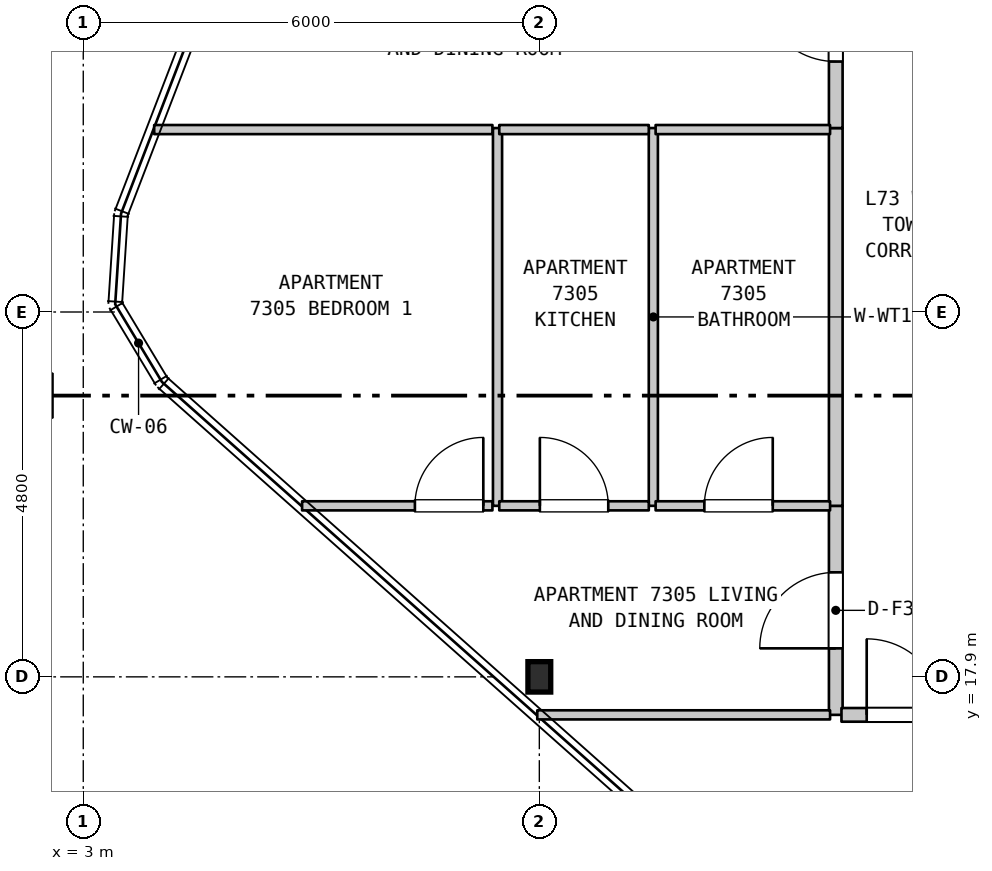
"""IFC4 building model, lengths in metres.
Left out: names, types, materials, properties, quantities, classifications, styles, units other than length and angle.
Written with IfcOpenShell. Run it as: python <this file> out.ifc"""

import sys

from ifc_helpers import new_model, si_unit, direction, frame, frame_2d, origin, origin_2d, place, context, subcontext, project, spatial, rectangle, i_section, extrude, element, fill, save


model = new_model("IFC4")
c1 = context("Model", 3, precision=1e-05, world=origin(), true_north=direction((0.0, 1.0)))
c2 = subcontext(c1, "Body", "Model", "MODEL_VIEW")
j1 = project(units=[si_unit("LENGTHUNIT", "METRE"), si_unit("PLANEANGLEUNIT", "RADIAN")], contexts=[c1])
p1 = place(None, origin())
s1 = spatial("IfcSite", under=j1, at=p1, CompositionType="ELEMENT")
p2 = place(p1, origin())
s2 = spatial("IfcBuilding", under=s1, at=p2, CompositionType="ELEMENT")
p3 = place(p2, frame((0.0, 0.0, 291.7)))
s3 = spatial("IfcBuildingStorey", under=s2, at=p3, CompositionType="ELEMENT", Elevation=291.7)
p4 = place(p3, frame((9.0, 17.9, 0.0), z_axis=(0.0, 0.0, 1.0), x_axis=(1.0, 0.0, 0.0)))
e1 = element("IfcColumn", 1, at=p4, inside=s3, PredefinedType="COLUMN", context=c2, shape_type="SweptSolid", body=[
    extrude(i_section(OverallWidth=0.3, OverallDepth=0.4, WebThickness=0.013, FlangeThickness=0.024, FilletRadius=0.027, at=origin_2d()), origin(), (0.0, 0.0, 1.0), 3.7),
])
for number, where, z_axis, x_axis in (
    (2, (8.45, 20.15, 0.0), (0.0, 0.0, 1.0), (0.0, 1.0, 0.0)),
    (3, (10.5, 20.15, 0.0), (0.0, 0.0, 1.0), (0.0, 1.0, 0.0)),
):
    element("IfcWall", number, at=place(p3, frame(where, z_axis=z_axis, x_axis=x_axis)), inside=s3, PredefinedType="PARTITIONING", context=c2, shape_type="SweptSolid", body=[
        extrude(rectangle(XDim=4.97, YDim=0.12, at=frame_2d((2.485, 0.0))), origin(), (0.0, 0.0, 1.0), 3.39),
    ])
p5 = place(p3, frame((12.9, 17.4, 0.0), z_axis=(0.0, 0.0, 1.0), x_axis=(0.0, 1.0, 0.0)))
e4 = element("IfcWall", 4, at=p5, inside=s3, PredefinedType="STANDARD", context=c2, shape_type="SweptSolid", body=[
    extrude(rectangle(XDim=2.75, YDim=0.18, at=frame_2d((1.375, 0.0))), origin(), (0.0, 0.0, 1.0), 3.39),
])
p6 = place(p5, frame((0.875, 0.0, 0.0)))
e5 = element("IfcOpeningElement", 5, at=p6, cuts=e4, PredefinedType="OPENING", context=c2, shape_type="SweptSolid", body=[
    extrude(rectangle(XDim=1.0, YDim=2.15, at=frame_2d((0.5, 1.075))), frame((0.0, 0.1, 0.0), z_axis=(0.0, -1.0, 0.0), x_axis=(1.0, 0.0, 0.0)), (0.0, 0.0, 1.0), 0.2),
])
p7 = place(p3, frame((12.9, 20.15, 0.0), z_axis=(0.0, 0.0, 1.0), x_axis=(0.0, 1.0, 0.0)))
e6 = element("IfcWall", 6, at=p7, inside=s3, PredefinedType="STANDARD", context=c2, shape_type="SweptSolid", body=[
    extrude(rectangle(XDim=4.97, YDim=0.18, at=frame_2d((2.485, 0.0))), origin(), (0.0, 0.0, 1.0), 3.39),
])
p8 = place(p3, frame((12.9, 25.12, 0.0), z_axis=(0.0, 0.0, 1.0), x_axis=(0.0, 1.0, 0.0)))
e7 = element("IfcWall", 7, at=p8, inside=s3, PredefinedType="STANDARD", context=c2, shape_type="SweptSolid", body=[
    extrude(rectangle(XDim=2.75, YDim=0.18, at=frame_2d((1.375, 0.0))), origin(), (0.0, 0.0, 1.0), 3.39),
])
p9 = place(p8, frame((0.875, 0.0, 0.0)))
e8 = element("IfcOpeningElement", 8, at=p9, cuts=e7, PredefinedType="OPENING", context=c2, shape_type="SweptSolid", body=[
    extrude(rectangle(XDim=1.0, YDim=2.15, at=frame_2d((0.5, 1.075))), frame((0.0, 0.1, 0.0), z_axis=(0.0, -1.0, 0.0), x_axis=(1.0, 0.0, 0.0)), (0.0, 0.0, 1.0), 0.2),
])
p10 = place(p3, frame((8.973, 17.4, 0.0), z_axis=(0.0, 0.0, 1.0), x_axis=(1.0, 0.0, 0.0)))
e9 = element("IfcWall", 9, at=p10, inside=s3, PredefinedType="PARTITIONING", context=c2, shape_type="SweptSolid", body=[
    extrude(rectangle(XDim=3.852, YDim=0.12, at=frame_2d((1.926, 0.0))), origin(), (0.0, 0.0, 1.0), 3.39),
])
p11 = place(p3, frame((12.975, 17.4, 0.0), z_axis=(0.0, 0.0, 1.0), x_axis=(1.0, 0.0, 0.0)))
e10 = element("IfcWall", 10, at=p11, inside=s3, PredefinedType="STANDARD", context=c2, shape_type="SweptSolid", body=[
    extrude(rectangle(XDim=3.18, YDim=0.18, at=frame_2d((1.59, 0.0))), origin(), (0.0, 0.0, 1.0), 3.39),
])
p12 = place(p11, frame((0.332, 0.0, 0.0)))
e11 = element("IfcOpeningElement", 11, at=p12, cuts=e10, PredefinedType="OPENING", context=c2, shape_type="SweptSolid", body=[
    extrude(rectangle(XDim=1.0, YDim=2.15, at=frame_2d((0.5, 1.075))), frame((0.0, 0.1, 0.0), z_axis=(0.0, -1.0, 0.0), x_axis=(1.0, 0.0, 0.0)), (0.0, 0.0, 1.0), 0.2),
])
p13 = place(p3, frame((5.879, 20.15, 0.0), z_axis=(0.0, 0.0, 1.0), x_axis=(1.0, 0.0, 0.0)))
e12 = element("IfcWall", 12, at=p13, inside=s3, PredefinedType="PARTITIONING", context=c2, shape_type="SweptSolid", body=[
    extrude(rectangle(XDim=2.504, YDim=0.12, at=frame_2d((1.252, 0.0))), origin(), (0.0, 0.0, 1.0), 3.39),
])
p14 = place(p13, frame((1.484, 0.0, 0.0)))
e13 = element("IfcOpeningElement", 13, at=p14, cuts=e12, PredefinedType="OPENING", context=c2, shape_type="SweptSolid", body=[
    extrude(rectangle(XDim=0.9, YDim=2.15, at=frame_2d((0.45, 1.075))), frame((0.0, 0.07, 0.0), z_axis=(0.0, -1.0, 0.0), x_axis=(1.0, 0.0, 0.0)), (0.0, 0.0, 1.0), 0.14),
])
p15 = place(p3, frame((8.473, 20.15, 0.0), z_axis=(0.0, 0.0, 1.0), x_axis=(1.0, 0.0, 0.0)))
e14 = element("IfcWall", 14, at=p15, inside=s3, PredefinedType="PARTITIONING", context=c2, shape_type="SweptSolid", body=[
    extrude(rectangle(XDim=1.967, YDim=0.12, at=frame_2d((0.983, 0.0))), origin(), (0.0, 0.0, 1.0), 3.39),
])
p16 = place(p15, frame((0.534, 0.0, 0.0)))
e15 = element("IfcOpeningElement", 15, at=p16, cuts=e14, PredefinedType="OPENING", context=c2, shape_type="SweptSolid", body=[
    extrude(rectangle(XDim=0.9, YDim=2.15, at=frame_2d((0.45, 1.075))), frame((0.0, 0.07, 0.0), z_axis=(0.0, -1.0, 0.0), x_axis=(1.0, 0.0, 0.0)), (0.0, 0.0, 1.0), 0.14),
])
p17 = place(p3, frame((10.53, 20.15, 0.0), z_axis=(0.0, 0.0, 1.0), x_axis=(1.0, 0.0, 0.0)))
e16 = element("IfcWall", 16, at=p17, inside=s3, PredefinedType="PARTITIONING", context=c2, shape_type="SweptSolid", body=[
    extrude(rectangle(XDim=2.295, YDim=0.12, at=frame_2d((1.147, 0.0))), origin(), (0.0, 0.0, 1.0), 3.39),
])
p18 = place(p17, frame((0.641, 0.0, 0.0)))
e17 = element("IfcOpeningElement", 17, at=p18, cuts=e16, PredefinedType="OPENING", context=c2, shape_type="SweptSolid", body=[
    extrude(rectangle(XDim=0.9, YDim=2.1, at=frame_2d((0.45, 1.05))), frame((0.0, 0.07, 0.0), z_axis=(0.0, -1.0, 0.0), x_axis=(1.0, 0.0, 0.0)), (0.0, 0.0, 1.0), 0.14),
])
p19 = place(p3, frame((3.933, 25.1, 0.0), z_axis=(0.0, 0.0, 1.0), x_axis=(1.0, 0.0, 0.0)))
e18 = element("IfcWall", 18, at=p19, inside=s3, PredefinedType="PARTITIONING", context=c2, shape_type="SweptSolid", body=[
    extrude(rectangle(XDim=4.45, YDim=0.12, at=frame_2d((2.225, 0.0))), origin(), (0.0, 0.0, 1.0), 3.39),
])
p20 = place(p3, frame((8.473, 25.1, 0.0), z_axis=(0.0, 0.0, 1.0), x_axis=(1.0, 0.0, 0.0)))
e19 = element("IfcWall", 19, at=p20, inside=s3, PredefinedType="PARTITIONING", context=c2, shape_type="SweptSolid", body=[
    extrude(rectangle(XDim=1.967, YDim=0.12, at=frame_2d((0.983, 0.0))), origin(), (0.0, 0.0, 1.0), 3.39),
])
p21 = place(p3, frame((10.53, 25.1, 0.0), z_axis=(0.0, 0.0, 1.0), x_axis=(1.0, 0.0, 0.0)))
e20 = element("IfcWall", 20, at=p21, inside=s3, PredefinedType="PARTITIONING", context=c2, shape_type="SweptSolid", body=[
    extrude(rectangle(XDim=2.295, YDim=0.12, at=frame_2d((1.147, 0.0))), origin(), (0.0, 0.0, 1.0), 3.39),
])
p22 = place(p6, origin())
e21 = element("IfcDoor", 21, at=p22, inside=s3, OperationType="SINGLE_SWING_LEFT", PredefinedType="DOOR", context=c2, shape_type="SweptSolid", body=[
    extrude(rectangle(XDim=1.0, YDim=2.15, at=frame_2d((0.5, 1.075))), frame((0.0, 0.025, 0.0), z_axis=(0.0, -1.0, 0.0), x_axis=(1.0, 0.0, 0.0)), (0.0, 0.0, 1.0), 0.05),
])
fill(e5, e21)
p23 = place(p9, origin())
e22 = element("IfcDoor", 22, at=p23, inside=s3, OperationType="SINGLE_SWING_RIGHT", PredefinedType="DOOR", context=c2, shape_type="SweptSolid", body=[
    extrude(rectangle(XDim=1.0, YDim=2.15, at=frame_2d((0.5, 1.075))), frame((0.0, 0.025, 0.0), z_axis=(0.0, -1.0, 0.0), x_axis=(1.0, 0.0, 0.0)), (0.0, 0.0, 1.0), 0.05),
])
fill(e8, e22)
p24 = place(p12, origin())
e23 = element("IfcDoor", 23, at=p24, inside=s3, OperationType="SINGLE_SWING_LEFT", PredefinedType="DOOR", context=c2, shape_type="SweptSolid", body=[
    extrude(rectangle(XDim=1.0, YDim=2.15, at=frame_2d((0.5, 1.075))), frame((0.0, 0.025, 0.0), z_axis=(0.0, -1.0, 0.0), x_axis=(1.0, 0.0, 0.0)), (0.0, 0.0, 1.0), 0.05),
])
fill(e11, e23)
p25 = place(p14, origin())
e24 = element("IfcDoor", 24, at=p25, inside=s3, OperationType="SINGLE_SWING_RIGHT", PredefinedType="DOOR", context=c2, shape_type="SweptSolid", body=[
    extrude(rectangle(XDim=0.9, YDim=2.15, at=frame_2d((0.45, 1.075))), frame((0.0, 0.025, 0.0), z_axis=(0.0, -1.0, 0.0), x_axis=(1.0, 0.0, 0.0)), (0.0, 0.0, 1.0), 0.05),
])
fill(e13, e24)
p26 = place(p16, origin())
e25 = element("IfcDoor", 25, at=p26, inside=s3, OperationType="SINGLE_SWING_LEFT", PredefinedType="DOOR", context=c2, shape_type="SweptSolid", body=[
    extrude(rectangle(XDim=0.9, YDim=2.15, at=frame_2d((0.45, 1.075))), frame((0.0, 0.025, 0.0), z_axis=(0.0, -1.0, 0.0), x_axis=(1.0, 0.0, 0.0)), (0.0, 0.0, 1.0), 0.05),
])
fill(e15, e25)
p27 = place(p18, origin())
e26 = element("IfcDoor", 26, at=p27, inside=s3, OperationType="SINGLE_SWING_RIGHT", PredefinedType="DOOR", context=c2, shape_type="SweptSolid", body=[
    extrude(rectangle(XDim=0.9, YDim=2.1, at=frame_2d((0.45, 1.05))), frame((0.0, 0.025, 0.0), z_axis=(0.0, -1.0, 0.0), x_axis=(1.0, 0.0, 0.0)), (0.0, 0.0, 1.0), 0.05),
])
fill(e17, e26)
save(model, sys.argv[1])
